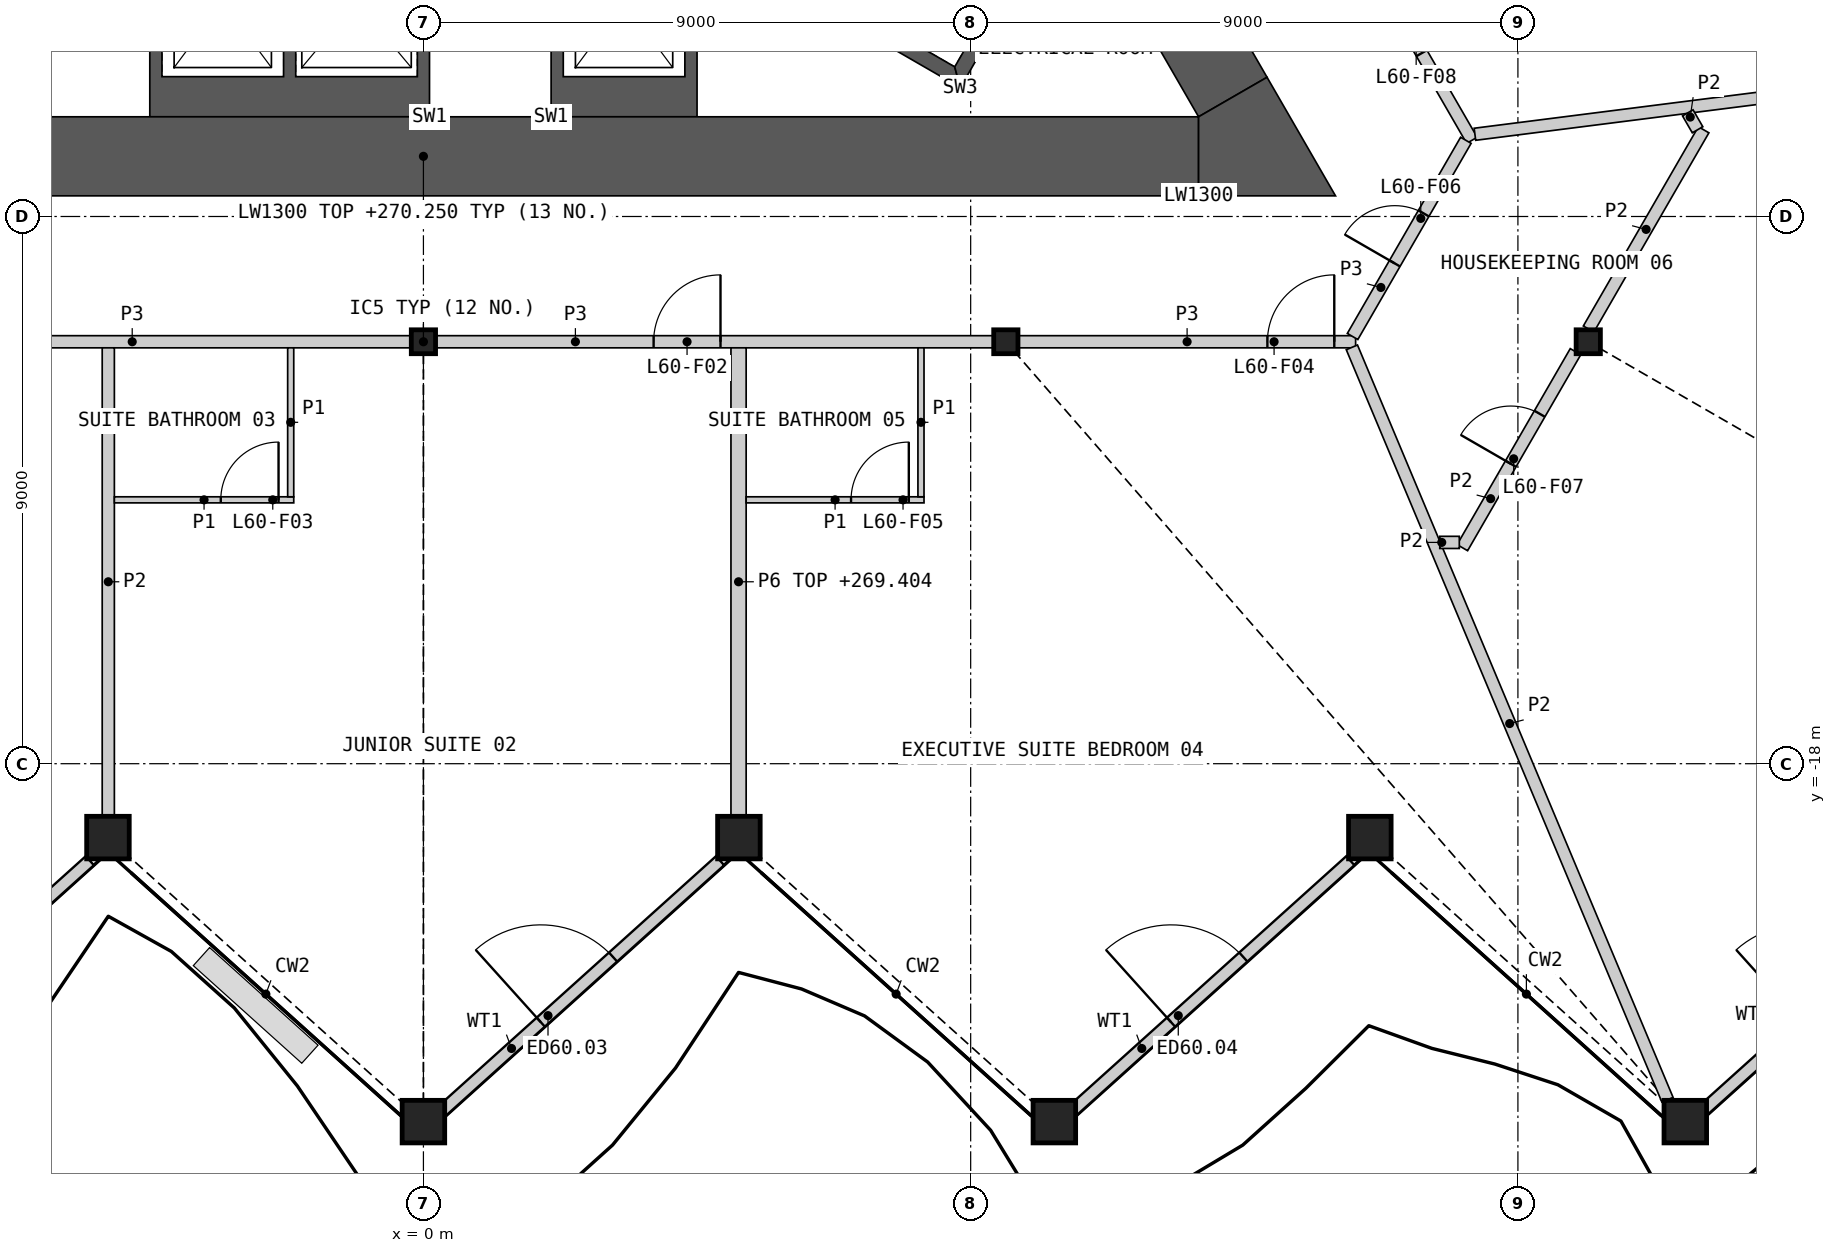
"""IFC4 building model, lengths in metres.
Left out: names, types, materials, properties, quantities, classifications, styles, units other than length and angle.
Written with IfcOpenShell. Run it as: python <this file> out.ifc"""

import sys

from ifc_helpers import new_model, si_unit, direction, frame, frame_2d, origin, origin_2d, place, context, subcontext, project, spatial, polyline, rectangle, hollow_rectangle, i_section, outline, extrude, element, fill, save


model = new_model("IFC4")
c1 = context("Model", 3, precision=1e-05, world=origin(), true_north=direction((0.0, 1.0)))
c2 = subcontext(c1, "Body", "Model", "MODEL_VIEW")
j1 = project(units=[si_unit("LENGTHUNIT", "METRE"), si_unit("PLANEANGLEUNIT", "RADIAN")], contexts=[c1])
p1 = place(None, origin())
s1 = spatial("IfcSite", under=j1, at=p1, CompositionType="ELEMENT")
p2 = place(p1, origin())
s2 = spatial("IfcBuilding", under=s1, at=p2, CompositionType="ELEMENT")
p3 = place(p2, frame((0.0, 0.0, 267.0)))
s3 = spatial("IfcBuildingStorey", under=s2, at=p3, CompositionType="ELEMENT", Elevation=267.0)
for number, where, z_axis, x_axis in (
    (1, (-5.188, -19.215, 0.0), (0.0, 0.0, 1.0), (1.0, 0.0, 0.0)),
    (2, (0.0, -23.887, 0.0), (0.0, 0.0, 1.0), (1.0, 0.0, 0.0)),
    (3, (5.188, -19.215, 0.0), (0.0, 0.0, 1.0), (1.0, 0.0, 0.0)),
    (4, (10.376, -23.887, 0.0), (0.0, 0.0, 1.0), (1.0, 0.0, 0.0)),
    (5, (15.565, -19.215, 0.0), (0.0, 0.0, 1.0), (1.0, 0.0, 0.0)),
    (6, (20.753, -23.887, 0.0), (0.0, 0.0, 1.0), (1.0, 0.0, 0.0)),
):
    element("IfcColumn", number, at=place(p3, frame(where, z_axis=z_axis, x_axis=x_axis)), inside=s3, PredefinedType="COLUMN", context=c2, shape_type="SweptSolid", body=[
        extrude(hollow_rectangle(XDim=0.7, YDim=0.7, WallThickness=0.045, at=origin_2d()), origin(), (0.0, 0.0, 1.0), 3.6),
    ])
for number, where, z_axis, x_axis in (
    (7, (0.0, -11.06, 0.0), (0.0, 0.0, 1.0), (1.0, 0.0, 0.0)),
    (8, (9.578, -11.06, 0.0), (0.0, 0.0, 1.0), (1.0, 0.0, 0.0)),
    (9, (19.157, -11.06, 0.0), (0.0, 0.0, 1.0), (1.0, 0.0, 0.0)),
):
    element("IfcColumn", number, at=place(p3, frame(where, z_axis=z_axis, x_axis=x_axis)), inside=s3, PredefinedType="COLUMN", context=c2, shape_type="SweptSolid", body=[
        extrude(i_section(OverallWidth=0.399, OverallDepth=0.393, WebThickness=0.023, FlangeThickness=0.037, at=origin_2d()), origin(), (0.0, 0.0, 1.0), 3.6),
    ])
p4 = place(p3, frame((-10.06, -23.713, 0.0), z_axis=(0.0, 0.0, 1.0), x_axis=(0.74316789204, 0.669104987458, 0.0)))
e10 = element("IfcWall", 10, at=p4, inside=s3, PredefinedType="SOLIDWALL", context=c2, shape_type="SweptSolid", body=[
    extrude(rectangle(XDim=6.154, YDim=0.2, at=frame_2d((3.077, 0.0))), origin(), (0.0, 0.0, 1.0), 2.701),
])
p5 = place(p4, frame((2.186, 0.0, 0.0)))
e11 = element("IfcOpeningElement", 11, at=p5, cuts=e10, PredefinedType="OPENING", context=c2, shape_type="SweptSolid", body=[
    extrude(rectangle(XDim=1.6, YDim=2.4, at=frame_2d((0.8, 1.2))), frame((0.0, 0.11, 0.0), z_axis=(0.0, -1.0, 0.0), x_axis=(1.0, 0.0, 0.0)), (0.0, 0.0, 1.0), 0.22),
])
p6 = place(p3, frame((0.305, -23.713, 0.0), z_axis=(0.0, 0.0, 1.0), x_axis=(0.74316789204, 0.669104987458, 0.0)))
e12 = element("IfcWall", 12, at=p6, inside=s3, PredefinedType="SOLIDWALL", context=c2, shape_type="SweptSolid", body=[
    extrude(rectangle(XDim=6.154, YDim=0.2, at=frame_2d((3.077, 0.0))), origin(), (0.0, 0.0, 1.0), 2.701),
])
p7 = place(p6, frame((2.186, 0.0, 0.0)))
e13 = element("IfcOpeningElement", 13, at=p7, cuts=e12, PredefinedType="OPENING", context=c2, shape_type="SweptSolid", body=[
    extrude(rectangle(XDim=1.6, YDim=2.4, at=frame_2d((0.8, 1.2))), frame((0.0, 0.11, 0.0), z_axis=(0.0, -1.0, 0.0), x_axis=(1.0, 0.0, 0.0)), (0.0, 0.0, 1.0), 0.22),
])
p8 = place(p3, frame((10.671, -23.713, 0.0), z_axis=(0.0, 0.0, 1.0), x_axis=(0.74316789204, 0.669104987458, 0.0)))
e14 = element("IfcWall", 14, at=p8, inside=s3, PredefinedType="SOLIDWALL", context=c2, shape_type="SweptSolid", body=[
    extrude(rectangle(XDim=6.154, YDim=0.2, at=frame_2d((3.077, 0.0))), origin(), (0.0, 0.0, 1.0), 2.701),
])
p9 = place(p8, frame((2.186, 0.0, 0.0)))
e15 = element("IfcOpeningElement", 15, at=p9, cuts=e14, PredefinedType="OPENING", context=c2, shape_type="SweptSolid", body=[
    extrude(rectangle(XDim=1.6, YDim=2.4, at=frame_2d((0.8, 1.2))), frame((0.0, 0.11, 0.0), z_axis=(0.0, -1.0, 0.0), x_axis=(1.0, 0.0, 0.0)), (0.0, 0.0, 1.0), 0.22),
])
p10 = place(p3, frame((21.036, -23.713, 0.0), z_axis=(0.0, 0.0, 1.0), x_axis=(0.743142515738, 0.669133171575, 0.0)))
e16 = element("IfcWall", 16, at=p10, inside=s3, PredefinedType="SOLIDWALL", context=c2, shape_type="SweptSolid", body=[
    extrude(rectangle(XDim=6.166, YDim=0.2, at=frame_2d((3.083, 0.0))), origin(), (0.0, 0.0, 1.0), 2.701),
])
p11 = place(p10, frame((2.186, 0.0, 0.0)))
e17 = element("IfcOpeningElement", 17, at=p11, cuts=e16, PredefinedType="OPENING", context=c2, shape_type="SweptSolid", body=[
    extrude(rectangle(XDim=1.6, YDim=2.4, at=frame_2d((0.8, 1.2))), frame((0.0, 0.11, 0.0), z_axis=(0.0, -1.0, 0.0), x_axis=(1.0, 0.0, 0.0)), (0.0, 0.0, 1.0), 0.22),
])
p12 = place(p3, origin())
e18 = element("IfcWall", 18, at=p12, inside=s3, PredefinedType="SHEAR", context=c2, shape_type="SweptSolid", body=[
    extrude(outline(polyline([(0.1, -7.36), (-4.5, -7.36), (-4.5, -4.4), (-4.3, -4.4), (-4.3, -6.7), (-2.3, -6.7), (-2.3, -4.4), (-2.1, -4.4), (-2.1, -6.7), (-0.1, -6.7), (-0.1, -4.4), (0.1, -4.4), (0.1, -7.36)])), origin(), (0.0, 0.0, 1.0), 3.25),
])
p13 = place(p3, origin())
e19 = element("IfcWall", 19, at=p13, inside=s3, PredefinedType="SHEAR", context=c2, shape_type="SweptSolid", body=[
    extrude(outline(polyline([(2.1, -7.36), (2.1, -4.4), (2.3, -4.4), (2.3, -6.7), (4.3, -6.7), (4.3, -4.4), (4.5, -4.4), (4.5, -7.36), (2.1, -7.36)])), origin(), (0.0, 0.0, 1.0), 3.25),
])
p14 = place(p3, origin())
e20 = element("IfcWall", 20, at=p14, inside=s3, PredefinedType="SHEAR", context=c2, shape_type="SweptSolid", body=[
    extrude(outline(polyline([(-8.738, -6.539), (-8.83, -6.881), (-3.763, -3.956), (-3.888, -3.739), (-8.738, -6.539)])), origin(), (0.0, 0.0, 1.0), 3.25),
])
p15 = place(p3, origin())
e21 = element("IfcWall", 21, at=p15, inside=s3, PredefinedType="SHEAR", context=c2, shape_type="SweptSolid", body=[
    extrude(outline(polyline([(3.763, -3.956), (8.83, -6.881), (8.738, -6.539), (3.888, -3.739), (3.763, -3.956)])), origin(), (0.0, 0.0, 1.0), 3.25),
])
p16 = place(p3, origin())
e22 = element("IfcWall", 22, at=p16, inside=s3, PredefinedType="SHEAR", context=c2, shape_type="SweptSolid", body=[
    extrude(outline(polyline([(8.83, -6.881), (10.374, -4.206), (10.032, -4.298), (8.738, -6.539), (8.83, -6.881)])), origin(), (0.0, 0.0, 1.0), 3.25),
])
p17 = place(p3, frame((-12.748, -8.01, 0.0), z_axis=(0.0, 0.0, 1.0), x_axis=(1.0, 0.0, 0.0)))
e23 = element("IfcWall", 23, at=p17, inside=s3, PredefinedType="SHEAR", context=c2, shape_type="SweptSolid", body=[
    extrude(rectangle(XDim=25.497, YDim=1.3, at=frame_2d((12.748, 0.0))), origin(), (0.0, 0.0, 1.0), 3.25),
])
p18 = place(p3, frame((13.311, -7.035, 0.0), z_axis=(0.0, 0.0, 1.0), x_axis=(-0.500003555838, 0.866023350811, 0.0)))
e24 = element("IfcWall", 24, at=p18, inside=s3, PredefinedType="SHEAR", context=c2, shape_type="SweptSolid", body=[
    extrude(rectangle(XDim=4.26, YDim=1.3, at=frame_2d((2.13, 0.0))), origin(), (0.0, 0.0, 1.0), 3.25),
])
p19 = place(p3, origin())
e25 = element("IfcWall", 25, at=p19, inside=s3, PredefinedType="SHEAR", context=c2, shape_type="SweptSolid", body=[
    extrude(outline(polyline([(12.748, -8.66), (12.748, -7.36), (13.874, -6.71), (15.0, -8.66), (12.748, -8.66)])), origin(), (0.0, 0.0, 1.0), 3.25),
])
p20 = place(p3, frame((0.209, -11.06, 0.0), z_axis=(0.0, 0.0, 1.0), x_axis=(1.0, 0.0, 0.0)))
e26 = element("IfcWall", 26, at=p20, inside=s3, PredefinedType="PARTITIONING", context=c2, shape_type="SweptSolid", body=[
    extrude(rectangle(XDim=9.159, YDim=0.2, at=frame_2d((4.58, 0.0))), origin(), (0.0, 0.0, 1.0), 3.25),
])
p21 = place(p20, frame((3.576, 0.0, 0.0)))
e27 = element("IfcOpeningElement", 27, at=p21, cuts=e26, PredefinedType="OPENING", context=c2, shape_type="SweptSolid", body=[
    extrude(rectangle(XDim=1.1, YDim=2.1, at=frame_2d((0.55, 1.05))), frame((0.0, 0.11, 0.0), z_axis=(0.0, -1.0, 0.0), x_axis=(1.0, 0.0, 0.0)), (0.0, 0.0, 1.0), 0.22),
])
p22 = place(p3, frame((-9.369, -11.06, 0.0), z_axis=(0.0, 0.0, 1.0), x_axis=(1.0, 0.0, 0.0)))
e28 = element("IfcWall", 28, at=p22, inside=s3, PredefinedType="PARTITIONING", context=c2, shape_type="SweptSolid", body=[
    extrude(rectangle(XDim=9.159, YDim=0.2, at=frame_2d((4.58, 0.0))), origin(), (0.0, 0.0, 1.0), 3.25),
])
p23 = place(p3, frame((5.183, -18.855, 0.0), z_axis=(0.0, 0.0, 1.0), x_axis=(0.0, 1.0, 0.0)))
e29 = element("IfcWall", 29, at=p23, inside=s3, PredefinedType="PARTITIONING", context=c2, shape_type="SweptSolid", body=[
    extrude(rectangle(XDim=7.695, YDim=0.25, at=frame_2d((3.848, 0.0))), origin(), (0.0, 0.0, 1.0), 2.404),
])
p24 = place(p3, frame((9.788, -11.06, 0.0), z_axis=(0.0, 0.0, 1.0), x_axis=(1.0, 0.0, 0.0)))
e30 = element("IfcWall", 30, at=p24, inside=s3, PredefinedType="PARTITIONING", context=c2, shape_type="SweptSolid", body=[
    extrude(rectangle(XDim=5.543, YDim=0.2, at=frame_2d((2.771, 0.0))), origin(), (0.0, 0.0, 1.0), 3.25),
])
p25 = place(p24, frame((4.092, 0.0, 0.0)))
e31 = element("IfcOpeningElement", 31, at=p25, cuts=e30, PredefinedType="OPENING", context=c2, shape_type="SweptSolid", body=[
    extrude(rectangle(XDim=1.1, YDim=2.1, at=frame_2d((0.55, 1.05))), frame((0.0, 0.11, 0.0), z_axis=(0.0, -1.0, 0.0), x_axis=(1.0, 0.0, 0.0)), (0.0, 0.0, 1.0), 0.22),
])
p26 = place(p3, frame((14.489, -2.975, 0.0), z_axis=(0.0, 0.0, 1.0), x_axis=(0.500017753321, -0.866015153657, 0.0)))
e32 = element("IfcWall", 32, at=p26, inside=s3, PredefinedType="PARTITIONING", context=c2, shape_type="SweptSolid", body=[
    extrude(rectangle(XDim=5.51, YDim=0.2, at=frame_2d((2.755, 0.0))), origin(), (0.0, 0.0, 1.0), 3.25),
])
p27 = place(p26, frame((2.056, 0.0, 0.0)))
e33 = element("IfcOpeningElement", 33, at=p27, cuts=e32, PredefinedType="OPENING", context=c2, shape_type="SweptSolid", body=[
    extrude(rectangle(XDim=1.8, YDim=2.1, at=frame_2d((0.9, 1.05))), frame((0.0, 0.11, 0.0), z_axis=(0.0, -1.0, 0.0), x_axis=(1.0, 0.0, 0.0)), (0.0, 0.0, 1.0), 0.22),
])
p28 = place(p3, frame((15.281, -10.974, 0.0), z_axis=(0.0, 0.0, 1.0), x_axis=(0.499958791762, 0.866049194065, 0.0)))
e34 = element("IfcWall", 34, at=p28, inside=s3, PredefinedType="PARTITIONING", context=c2, shape_type="SweptSolid", body=[
    extrude(rectangle(XDim=3.726, YDim=0.2, at=frame_2d((1.863, 0.0))), origin(), (0.0, 0.0, 1.0), 3.25),
])
p29 = place(p28, frame((1.388, 0.0, 0.0)))
e35 = element("IfcOpeningElement", 35, at=p29, cuts=e34, PredefinedType="OPENING", context=c2, shape_type="SweptSolid", body=[
    extrude(rectangle(XDim=0.95, YDim=2.1, at=frame_2d((0.475, 1.05))), frame((0.0, 0.11, 0.0), z_axis=(0.0, -1.0, 0.0), x_axis=(1.0, 0.0, 0.0)), (0.0, 0.0, 1.0), 0.22),
])
p30 = place(p3, frame((17.293, -7.648, 0.0), z_axis=(0.0, 0.0, 1.0), x_axis=(0.992013080374, 0.126135040205, 0.0)))
e36 = element("IfcWall", 36, at=p30, inside=s3, PredefinedType="PARTITIONING", context=c2, shape_type="SweptSolid", body=[
    extrude(rectangle(XDim=13.518, YDim=0.2, at=frame_2d((6.759, 0.0))), origin(), (0.0, 0.0, 1.0), 2.404),
])
p31 = place(p3, frame((15.27, -11.153, 0.0), z_axis=(0.0, 0.0, 1.0), x_axis=(0.386788567553, -0.922168424969, 0.0)))
e37 = element("IfcWall", 37, at=p31, inside=s3, PredefinedType="PARTITIONING", context=c2, shape_type="SweptSolid", body=[
    extrude(rectangle(XDim=13.419, YDim=0.2, at=frame_2d((6.709, 0.0))), origin(), (0.0, 0.0, 1.0), 2.404),
])
p32 = place(p3, frame((-5.183, -18.855, 0.0), z_axis=(0.0, 0.0, 1.0), x_axis=(0.0, 1.0, 0.0)))
e38 = element("IfcWall", 38, at=p32, inside=s3, PredefinedType="PARTITIONING", context=c2, shape_type="SweptSolid", body=[
    extrude(rectangle(XDim=7.695, YDim=0.2, at=frame_2d((3.848, 0.0))), origin(), (0.0, 0.0, 1.0), 2.404),
])
p33 = place(p3, frame((19.162, -10.851, 0.0), z_axis=(0.0, 0.0, 1.0), x_axis=(0.500011000363, 0.866019052629, 0.0)))
e39 = element("IfcWall", 39, at=p33, inside=s3, PredefinedType="PARTITIONING", context=c2, shape_type="SweptSolid", body=[
    extrude(rectangle(XDim=3.784, YDim=0.2, at=frame_2d((1.892, 0.0))), origin(), (0.0, 0.0, 1.0), 2.404),
])
p34 = place(p3, frame((17.086, -14.447, 0.0), z_axis=(0.0, 0.0, 1.0), x_axis=(0.500004411858, 0.866022856582, 0.0)))
e40 = element("IfcWall", 40, at=p34, inside=s3, PredefinedType="PARTITIONING", context=c2, shape_type="SweptSolid", body=[
    extrude(rectangle(XDim=3.723, YDim=0.2, at=frame_2d((1.861, 0.0))), origin(), (0.0, 0.0, 1.0), 2.404),
])
p35 = place(p34, frame((1.593, 0.0, 0.0)))
e41 = element("IfcOpeningElement", 41, at=p35, cuts=e40, PredefinedType="OPENING", context=c2, shape_type="SweptSolid", body=[
    extrude(rectangle(XDim=0.95, YDim=2.1, at=frame_2d((0.475, 1.05))), frame((0.0, 0.11, 0.0), z_axis=(0.0, -1.0, 0.0), x_axis=(1.0, 0.0, 0.0)), (0.0, 0.0, 1.0), 0.22),
])
p36 = place(p3, frame((20.794, -7.295, 0.0), z_axis=(0.0, 0.0, 1.0), x_axis=(0.499897828833, -0.8660843843, 0.0)))
e42 = element("IfcWall", 42, at=p36, inside=s3, PredefinedType="PARTITIONING", context=c2, shape_type="SweptSolid", body=[
    extrude(rectangle(XDim=0.321, YDim=0.2, at=frame_2d((0.161, 0.0))), origin(), (0.0, 0.0, 1.0), 2.404),
])
p37 = place(p3, frame((16.715, -14.36, 0.0), z_axis=(0.0, 0.0, 1.0), x_axis=(1.0, 0.0, 0.0)))
e43 = element("IfcWall", 43, at=p37, inside=s3, PredefinedType="PARTITIONING", context=c2, shape_type="SweptSolid", body=[
    extrude(rectangle(XDim=0.321, YDim=0.2, at=frame_2d((0.161, 0.0))), origin(), (0.0, 0.0, 1.0), 2.404),
])
p38 = place(p3, frame((5.308, -13.66, 0.0), z_axis=(0.0, 0.0, 1.0), x_axis=(1.0, 0.0, 0.0)))
e44 = element("IfcWall", 44, at=p38, inside=s3, PredefinedType="PARTITIONING", context=c2, shape_type="SweptSolid", body=[
    extrude(rectangle(XDim=2.925, YDim=0.1, at=frame_2d((1.462, 0.0))), origin(), (0.0, 0.0, 1.0), 2.404),
])
p39 = place(p38, frame((1.725, 0.0, 0.0)))
e45 = element("IfcOpeningElement", 45, at=p39, cuts=e44, PredefinedType="OPENING", context=c2, shape_type="SweptSolid", body=[
    extrude(rectangle(XDim=0.95, YDim=2.1, at=frame_2d((0.475, 1.05))), frame((0.0, 0.06, 0.0), z_axis=(0.0, -1.0, 0.0), x_axis=(1.0, 0.0, 0.0)), (0.0, 0.0, 1.0), 0.12),
])
p40 = place(p3, frame((-5.083, -13.66, 0.0), z_axis=(0.0, 0.0, 1.0), x_axis=(1.0, 0.0, 0.0)))
e46 = element("IfcWall", 46, at=p40, inside=s3, PredefinedType="PARTITIONING", context=c2, shape_type="SweptSolid", body=[
    extrude(rectangle(XDim=2.95, YDim=0.1, at=frame_2d((1.475, 0.0))), origin(), (0.0, 0.0, 1.0), 2.404),
])
p41 = place(p40, frame((1.75, 0.0, 0.0)))
e47 = element("IfcOpeningElement", 47, at=p41, cuts=e46, PredefinedType="OPENING", context=c2, shape_type="SweptSolid", body=[
    extrude(rectangle(XDim=0.95, YDim=2.1, at=frame_2d((0.475, 1.05))), frame((0.0, 0.06, 0.0), z_axis=(0.0, -1.0, 0.0), x_axis=(1.0, 0.0, 0.0)), (0.0, 0.0, 1.0), 0.12),
])
for number, where, z_axis, x_axis in (
    (48, (-2.183, -13.61, 0.0), (0.0, 0.0, 1.0), (0.0, 1.0, 0.0)),
    (49, (8.183, -13.61, 0.0), (0.0, 0.0, 1.0), (0.0, 1.0, 0.0)),
):
    element("IfcWall", number, at=place(p3, frame(where, z_axis=z_axis, x_axis=x_axis)), inside=s3, PredefinedType="PARTITIONING", context=c2, shape_type="SweptSolid", body=[
        extrude(rectangle(XDim=2.45, YDim=0.1, at=frame_2d((1.225, 0.0))), origin(), (0.0, 0.0, 1.0), 2.404),
    ])
p42 = place(p7, origin())
e50 = element("IfcDoor", 50, at=p42, inside=s3, OperationType="DOUBLE_DOOR_SINGLE_SWING", PredefinedType="DOOR", context=c2, shape_type="SweptSolid", body=[
    extrude(rectangle(XDim=1.6, YDim=2.4, at=frame_2d((0.8, 1.2))), frame((0.0, 0.025, 0.0), z_axis=(0.0, -1.0, 0.0), x_axis=(1.0, 0.0, 0.0)), (0.0, 0.0, 1.0), 0.05),
])
fill(e13, e50)
p43 = place(p9, origin())
e51 = element("IfcDoor", 51, at=p43, inside=s3, OperationType="DOUBLE_DOOR_SINGLE_SWING", PredefinedType="DOOR", context=c2, shape_type="SweptSolid", body=[
    extrude(rectangle(XDim=1.6, YDim=2.4, at=frame_2d((0.8, 1.2))), frame((0.0, 0.025, 0.0), z_axis=(0.0, -1.0, 0.0), x_axis=(1.0, 0.0, 0.0)), (0.0, 0.0, 1.0), 0.05),
])
fill(e15, e51)
p44 = place(p21, origin())
e52 = element("IfcDoor", 52, at=p44, inside=s3, OperationType="SINGLE_SWING_RIGHT", PredefinedType="DOOR", context=c2, shape_type="SweptSolid", body=[
    extrude(rectangle(XDim=1.1, YDim=2.1, at=frame_2d((0.55, 1.05))), frame((0.0, 0.025, 0.0), z_axis=(0.0, -1.0, 0.0), x_axis=(1.0, 0.0, 0.0)), (0.0, 0.0, 1.0), 0.05),
])
fill(e27, e52)
p45 = place(p41, origin())
e53 = element("IfcDoor", 53, at=p45, inside=s3, OperationType="SINGLE_SWING_RIGHT", PredefinedType="DOOR", context=c2, shape_type="SweptSolid", body=[
    extrude(rectangle(XDim=0.95, YDim=2.1, at=frame_2d((0.475, 1.05))), frame((0.0, 0.025, 0.0), z_axis=(0.0, -1.0, 0.0), x_axis=(1.0, 0.0, 0.0)), (0.0, 0.0, 1.0), 0.05),
])
fill(e47, e53)
p46 = place(p25, origin())
e54 = element("IfcDoor", 54, at=p46, inside=s3, OperationType="SINGLE_SWING_RIGHT", PredefinedType="DOOR", context=c2, shape_type="SweptSolid", body=[
    extrude(rectangle(XDim=1.1, YDim=2.1, at=frame_2d((0.55, 1.05))), frame((0.0, 0.025, 0.0), z_axis=(0.0, -1.0, 0.0), x_axis=(1.0, 0.0, 0.0)), (0.0, 0.0, 1.0), 0.05),
])
fill(e31, e54)
p47 = place(p39, origin())
e55 = element("IfcDoor", 55, at=p47, inside=s3, OperationType="SINGLE_SWING_RIGHT", PredefinedType="DOOR", context=c2, shape_type="SweptSolid", body=[
    extrude(rectangle(XDim=0.95, YDim=2.1, at=frame_2d((0.475, 1.05))), frame((0.0, 0.025, 0.0), z_axis=(0.0, -1.0, 0.0), x_axis=(1.0, 0.0, 0.0)), (0.0, 0.0, 1.0), 0.05),
])
fill(e45, e55)
p48 = place(p29, origin())
e56 = element("IfcDoor", 56, at=p48, inside=s3, OperationType="SINGLE_SWING_LEFT", PredefinedType="DOOR", context=c2, shape_type="SweptSolid", body=[
    extrude(rectangle(XDim=0.95, YDim=2.1, at=frame_2d((0.475, 1.05))), frame((0.0, 0.025, 0.0), z_axis=(0.0, -1.0, 0.0), x_axis=(1.0, 0.0, 0.0)), (0.0, 0.0, 1.0), 0.05),
])
fill(e35, e56)
p49 = place(p35, origin())
e57 = element("IfcDoor", 57, at=p49, inside=s3, OperationType="SINGLE_SWING_LEFT", PredefinedType="DOOR", context=c2, shape_type="SweptSolid", body=[
    extrude(rectangle(XDim=0.95, YDim=2.1, at=frame_2d((0.475, 1.05))), frame((0.0, 0.025, 0.0), z_axis=(0.0, -1.0, 0.0), x_axis=(1.0, 0.0, 0.0)), (0.0, 0.0, 1.0), 0.05),
])
fill(e41, e57)
p50 = place(p27, origin())
e58 = element("IfcDoor", 58, at=p50, inside=s3, OperationType="DOUBLE_DOOR_SINGLE_SWING", PredefinedType="DOOR", context=c2, shape_type="SweptSolid", body=[
    extrude(rectangle(XDim=1.8, YDim=2.1, at=frame_2d((0.9, 1.05))), frame((0.0, 0.025, 0.0), z_axis=(0.0, -1.0, 0.0), x_axis=(1.0, 0.0, 0.0)), (0.0, 0.0, 1.0), 0.05),
])
fill(e33, e58)
save(model, sys.argv[1])
